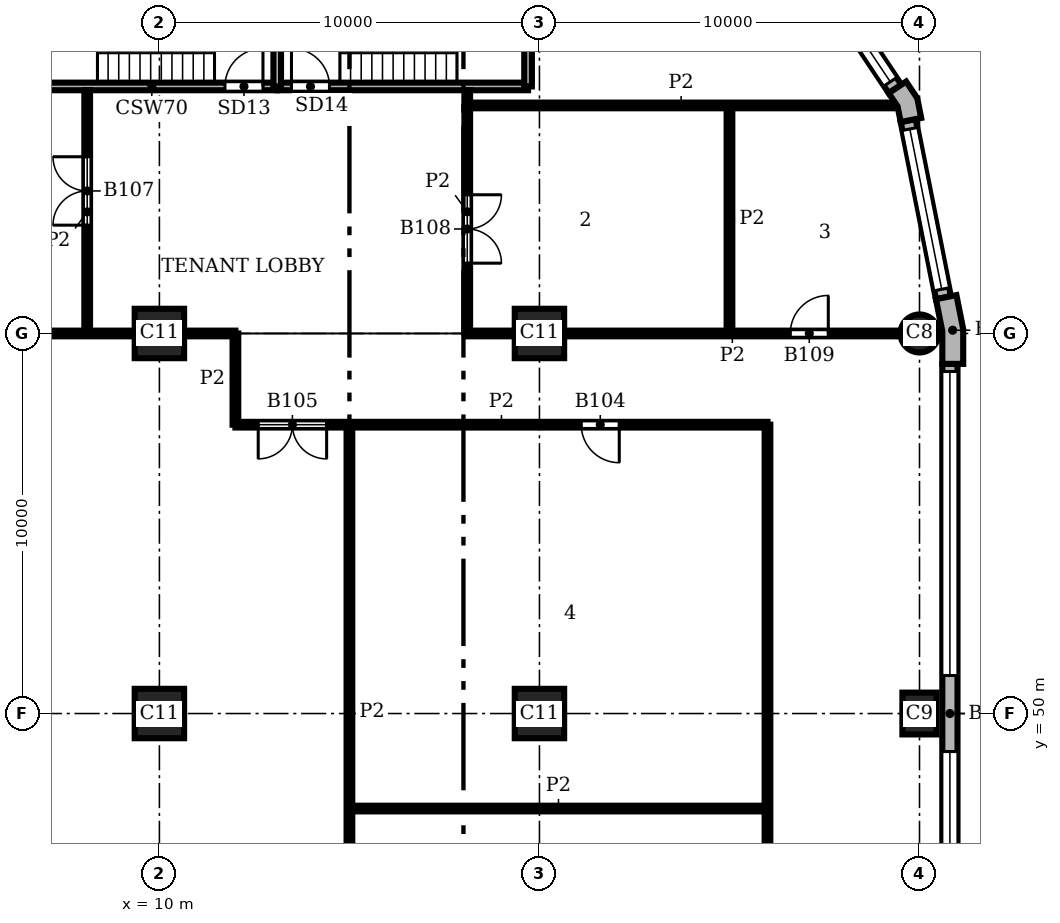
"""IFC4 building model, lengths in metres.
Left out: names, types, materials, properties, quantities, classifications, styles, units other than length and angle.
Written with IfcOpenShell. Run it as: python <this file> out.ifc"""

import sys

from ifc_helpers import new_model, si_unit, direction, frame, frame_2d, origin, origin_2d, place, context, subcontext, project, spatial, polyline, rectangle, circle, outline, extrude, element, fill, save


model = new_model("IFC4")
c1 = context("Model", 3, precision=1e-05, world=origin(), true_north=direction((0.0, 1.0)))
c2 = subcontext(c1, "Body", "Model", "MODEL_VIEW")
j1 = project(units=[si_unit("LENGTHUNIT", "METRE"), si_unit("PLANEANGLEUNIT", "RADIAN")], contexts=[c1])
p1 = place(None, origin())
s1 = spatial("IfcSite", under=j1, at=p1, CompositionType="ELEMENT")
p2 = place(p1, origin())
s2 = spatial("IfcBuilding", under=s1, at=p2, CompositionType="ELEMENT")
p3 = place(p2, frame((0.0, 0.0, 131.7)))
s3 = spatial("IfcBuildingStorey", under=s2, at=p3, CompositionType="ELEMENT", Elevation=131.7)
p4 = place(p3, frame((30.0, 50.0, 0.0), z_axis=(0.0, 0.0, 1.0), x_axis=(0.0, 1.0, 0.0)))
e1 = element("IfcColumn", 1, at=p4, inside=s3, PredefinedType="COLUMN", context=c2, shape_type="SweptSolid", body=[
    extrude(rectangle(XDim=1.1, YDim=0.9, at=origin_2d()), origin(), (0.0, 0.0, 1.0), 3.9),
])
p5 = place(p3, frame((30.0, 60.0, 0.0), z_axis=(0.0, 0.0, 1.0), x_axis=(1.0, 0.0, 0.0)))
e2 = element("IfcColumn", 2, at=p5, inside=s3, PredefinedType="COLUMN", context=c2, shape_type="SweptSolid", body=[
    extrude(circle(Radius=0.5, at=origin_2d()), origin(), (0.0, 0.0, 1.0), 3.9),
])
for number, where, z_axis, x_axis in (
    (3, (10.0, 50.0, 0.0), (0.0, 0.0, 1.0), (1.0, 0.0, 0.0)),
    (4, (10.0, 60.0, 0.0), (0.0, 0.0, 1.0), (1.0, 0.0, 0.0)),
    (5, (20.0, 50.0, 0.0), (0.0, 0.0, 1.0), (1.0, 0.0, 0.0)),
    (6, (20.0, 60.0, 0.0), (0.0, 0.0, 1.0), (1.0, 0.0, 0.0)),
):
    element("IfcColumn", number, at=place(p3, frame(where, z_axis=z_axis, x_axis=x_axis)), inside=s3, PredefinedType="COLUMN", context=c2, shape_type="SweptSolid", body=[
        extrude(rectangle(XDim=1.3, YDim=1.3, at=origin_2d()), origin(), (0.0, 0.0, 1.0), 3.9),
    ])
p6 = place(p3, origin())
e7 = element("IfcWall", 7, at=p6, inside=s3, PredefinedType="SOLIDWALL", context=c2, shape_type="SweptSolid", body=[
    extrude(outline(polyline([(31.0, 59.2), (31.15, 59.2), (31.15, 60.113), (30.972, 61.009), (30.825, 60.98), (30.432, 60.902), (30.6, 60.059), (30.6, 59.2), (31.0, 59.2)])), origin(), (0.0, 0.0, 1.0), 3.9),
])
e8 = element("IfcWall", 8, at=p6, inside=s3, PredefinedType="SOLIDWALL", context=c2, shape_type="SweptSolid", body=[
    extrude(outline(polyline([(29.897, 65.641), (30.045, 65.67), (29.941, 66.189), (29.648, 66.629), (29.523, 66.545), (29.19, 66.323), (29.423, 65.974), (29.505, 65.563), (29.897, 65.641)])), origin(), (0.0, 0.0, 1.0), 3.9),
])
p7 = place(p3, frame((30.8, 40.8, 0.0), z_axis=(0.0, 0.0, 1.0), x_axis=(0.0, 1.0, 0.0)))
e9 = element("IfcWall", 9, at=p7, inside=s3, PredefinedType="SOLIDWALL", context=c2, shape_type="SweptSolid", body=[
    extrude(rectangle(XDim=18.4, YDim=0.4, at=frame_2d((9.2, 0.0))), origin(), (0.0, 0.0, 1.0), 3.9),
])
p8 = place(p7, frame((0.2, 0.0, 0.9)))
e10 = element("IfcOpeningElement", 10, at=p8, cuts=e9, PredefinedType="OPENING", context=c2, shape_type="SweptSolid", body=[
    extrude(rectangle(XDim=8.0, YDim=2.35, at=frame_2d((4.0, 1.175))), frame((0.0, 0.21, 0.0), z_axis=(0.0, -1.0, 0.0), x_axis=(1.0, 0.0, 0.0)), (0.0, 0.0, 1.0), 0.42),
])
p9 = place(p7, frame((10.2, 0.0, 0.9)))
e11 = element("IfcOpeningElement", 11, at=p9, cuts=e9, PredefinedType="OPENING", context=c2, shape_type="SweptSolid", body=[
    extrude(rectangle(XDim=8.0, YDim=2.35, at=frame_2d((4.0, 1.175))), frame((0.0, 0.21, 0.0), z_axis=(0.0, -1.0, 0.0), x_axis=(1.0, 0.0, 0.0)), (0.0, 0.0, 1.0), 0.42),
])
p10 = place(p3, frame((30.629, 60.941, 0.0), z_axis=(0.0, 0.0, 1.0), x_axis=(-0.195098533057, 0.98078364709, 0.0)))
e12 = element("IfcWall", 12, at=p10, inside=s3, PredefinedType="SOLIDWALL", context=c2, shape_type="SweptSolid", body=[
    extrude(rectangle(XDim=4.753, YDim=0.4, at=frame_2d((2.376, 0.0))), origin(), (0.0, 0.0, 1.0), 3.9),
])
p11 = place(p10, frame((0.226, 0.0, 0.9)))
e13 = element("IfcOpeningElement", 13, at=p11, cuts=e12, PredefinedType="OPENING", context=c2, shape_type="SweptSolid", body=[
    extrude(rectangle(XDim=4.3, YDim=2.35, at=frame_2d((2.15, 1.175))), frame((0.0, 0.21, 0.0), z_axis=(0.0, -1.0, 0.0), x_axis=(1.0, 0.0, 0.0)), (0.0, 0.0, 1.0), 0.42),
])
p12 = place(p3, frame((29.357, 66.434, 0.0), z_axis=(0.0, 0.0, 1.0), x_axis=(-0.555541552266, 0.831488775454, 0.0)))
e14 = element("IfcWall", 14, at=p12, inside=s3, PredefinedType="SOLIDWALL", context=c2, shape_type="SweptSolid", body=[
    extrude(rectangle(XDim=4.753, YDim=0.4, at=frame_2d((2.376, 0.0))), origin(), (0.0, 0.0, 1.0), 3.9),
])
p13 = place(p12, frame((0.226, 0.0, 0.9)))
e15 = element("IfcOpeningElement", 15, at=p13, cuts=e14, PredefinedType="OPENING", context=c2, shape_type="SweptSolid", body=[
    extrude(rectangle(XDim=4.3, YDim=2.35, at=frame_2d((2.15, 1.175))), frame((0.0, 0.21, 0.0), z_axis=(0.0, -1.0, 0.0), x_axis=(1.0, 0.0, 0.0)), (0.0, 0.0, 1.0), 0.42),
])
p14 = place(p3, frame((6.5, 66.5, 0.0), z_axis=(0.0, 0.0, 1.0), x_axis=(1.0, 0.0, 0.0)))
e16 = element("IfcWall", 16, at=p14, inside=s3, PredefinedType="SHEAR", context=c2, shape_type="SweptSolid", body=[
    extrude(rectangle(XDim=6.6, YDim=0.2, at=frame_2d((3.3, 0.0))), origin(), (0.0, 0.0, 1.0), 3.58),
])
p15 = place(p14, frame((5.225, 0.0, 0.0)))
e17 = element("IfcOpeningElement", 17, at=p15, cuts=e16, PredefinedType="OPENING", context=c2, shape_type="SweptSolid", body=[
    extrude(rectangle(XDim=1.0, YDim=2.1, at=frame_2d((0.5, 1.05))), frame((0.0, 0.11, 0.0), z_axis=(0.0, -1.0, 0.0), x_axis=(1.0, 0.0, 0.0)), (0.0, 0.0, 1.0), 0.22),
])
p16 = place(p3, frame((13.1, 66.5, 0.0), z_axis=(0.0, 0.0, 1.0), x_axis=(1.0, 0.0, 0.0)))
e18 = element("IfcWall", 18, at=p16, inside=s3, PredefinedType="SHEAR", context=c2, shape_type="SweptSolid", body=[
    extrude(rectangle(XDim=6.6, YDim=0.2, at=frame_2d((3.3, 0.0))), origin(), (0.0, 0.0, 1.0), 3.58),
])
p17 = place(p16, frame((0.375, 0.0, 0.0)))
e19 = element("IfcOpeningElement", 19, at=p17, cuts=e18, PredefinedType="OPENING", context=c2, shape_type="SweptSolid", body=[
    extrude(rectangle(XDim=1.0, YDim=2.1, at=frame_2d((0.5, 1.05))), frame((0.0, 0.11, 0.0), z_axis=(0.0, -1.0, 0.0), x_axis=(1.0, 0.0, 0.0)), (0.0, 0.0, 1.0), 0.22),
])
for number, where, z_axis, x_axis in (
    (20, (13.1, 66.5, 0.0), (0.0, 0.0, 1.0), (0.0, 1.0, 0.0)),
    (21, (19.7, 66.5, 0.0), (0.0, 0.0, 1.0), (0.0, 1.0, 0.0)),
):
    element("IfcWall", number, at=place(p3, frame(where, z_axis=z_axis, x_axis=x_axis)), inside=s3, PredefinedType="SHEAR", context=c2, shape_type="SweptSolid", body=[
        extrude(rectangle(XDim=3.3, YDim=0.2, at=frame_2d((1.65, 0.0))), origin(), (0.0, 0.0, 1.0), 3.58),
    ])
p18 = place(p3, frame((8.1, 60.0, 0.0), z_axis=(0.0, 0.0, 1.0), x_axis=(0.0, 1.0, 0.0)))
e22 = element("IfcWall", 22, at=p18, inside=s3, PredefinedType="PARTITIONING", context=c2, shape_type="SweptSolid", body=[
    extrude(rectangle(XDim=6.4, YDim=0.15, at=frame_2d((3.2, 0.0))), origin(), (0.0, 0.0, 1.0), 3.58),
])
p19 = place(p18, frame((2.85, 0.0, 0.0)))
e23 = element("IfcOpeningElement", 23, at=p19, cuts=e22, PredefinedType="OPENING", context=c2, shape_type="SweptSolid", body=[
    extrude(rectangle(XDim=1.8, YDim=2.1, at=frame_2d((0.9, 1.05))), frame((0.0, 0.085, 0.0), z_axis=(0.0, -1.0, 0.0), x_axis=(1.0, 0.0, 0.0)), (0.0, 0.0, 1.0), 0.17),
])
p20 = place(p3, frame((12.0, 57.6, 0.0), z_axis=(0.0, 0.0, 1.0), x_axis=(0.0, 1.0, 0.0)))
e24 = element("IfcWall", 24, at=p20, inside=s3, PredefinedType="PARTITIONING", context=c2, shape_type="SweptSolid", body=[
    extrude(rectangle(XDim=2.4, YDim=0.15, at=frame_2d((1.2, 0.0))), origin(), (0.0, 0.0, 1.0), 3.58),
])
p21 = place(p3, frame((15.0, 42.5, 0.0), z_axis=(0.0, 0.0, 1.0), x_axis=(0.0, 1.0, 0.0)))
e25 = element("IfcWall", 25, at=p21, inside=s3, PredefinedType="PARTITIONING", context=c2, shape_type="SweptSolid", body=[
    extrude(rectangle(XDim=15.1, YDim=0.15, at=frame_2d((7.55, 0.0))), origin(), (0.0, 0.0, 1.0), 3.58),
])
p22 = place(p3, frame((18.1, 60.0, 0.0), z_axis=(0.0, 0.0, 1.0), x_axis=(0.0, 1.0, 0.0)))
e26 = element("IfcWall", 26, at=p22, inside=s3, PredefinedType="PARTITIONING", context=c2, shape_type="SweptSolid", body=[
    extrude(rectangle(XDim=6.4, YDim=0.15, at=frame_2d((3.2, 0.0))), origin(), (0.0, 0.0, 1.0), 3.58),
])
p23 = place(p22, frame((1.85, 0.0, 0.0)))
e27 = element("IfcOpeningElement", 27, at=p23, cuts=e26, PredefinedType="OPENING", context=c2, shape_type="SweptSolid", body=[
    extrude(rectangle(XDim=1.8, YDim=2.1, at=frame_2d((0.9, 1.05))), frame((0.0, 0.085, 0.0), z_axis=(0.0, -1.0, 0.0), x_axis=(1.0, 0.0, 0.0)), (0.0, 0.0, 1.0), 0.17),
])
p24 = place(p3, frame((25.0, 60.0, 0.0), z_axis=(0.0, 0.0, 1.0), x_axis=(0.0, 1.0, 0.0)))
e28 = element("IfcWall", 28, at=p24, inside=s3, PredefinedType="PARTITIONING", context=c2, shape_type="SweptSolid", body=[
    extrude(rectangle(XDim=6.0, YDim=0.15, at=frame_2d((3.0, 0.0))), origin(), (0.0, 0.0, 1.0), 3.58),
])
p25 = place(p3, frame((26.0, 28.0, 0.0), z_axis=(0.0, 0.0, 1.0), x_axis=(0.0, 1.0, 0.0)))
e29 = element("IfcWall", 29, at=p25, inside=s3, PredefinedType="PARTITIONING", context=c2, shape_type="SweptSolid", body=[
    extrude(rectangle(XDim=29.6, YDim=0.15, at=frame_2d((14.8, 0.0))), origin(), (0.0, 0.0, 1.0), 3.58),
])
p26 = place(p25, frame((7.85, 0.0, 0.0)))
e30 = element("IfcOpeningElement", 30, at=p26, cuts=e29, PredefinedType="OPENING", context=c2, shape_type="SweptSolid", body=[
    extrude(rectangle(XDim=1.8, YDim=2.1, at=frame_2d((0.9, 1.05))), frame((0.0, 0.085, 0.0), z_axis=(0.0, -1.0, 0.0), x_axis=(1.0, 0.0, 0.0)), (0.0, 0.0, 1.0), 0.17),
])
p27 = place(p3, frame((15.0, 47.5, 0.0), z_axis=(0.0, 0.0, 1.0), x_axis=(1.0, 0.0, 0.0)))
e31 = element("IfcWall", 31, at=p27, inside=s3, PredefinedType="PARTITIONING", context=c2, shape_type="SweptSolid", body=[
    extrude(rectangle(XDim=11.0, YDim=0.15, at=frame_2d((5.5, 0.0))), origin(), (0.0, 0.0, 1.0), 3.58),
])
p28 = place(p3, frame((12.0, 57.6, 0.0), z_axis=(0.0, 0.0, 1.0), x_axis=(1.0, 0.0, 0.0)))
e32 = element("IfcWall", 32, at=p28, inside=s3, PredefinedType="PARTITIONING", context=c2, shape_type="SweptSolid", body=[
    extrude(rectangle(XDim=14.0, YDim=0.15, at=frame_2d((7.0, 0.0))), origin(), (0.0, 0.0, 1.0), 3.58),
])
p29 = place(p28, frame((9.1, 0.0, 0.0)))
e33 = element("IfcOpeningElement", 33, at=p29, cuts=e32, PredefinedType="OPENING", context=c2, shape_type="SweptSolid", body=[
    extrude(rectangle(XDim=1.0, YDim=2.1, at=frame_2d((0.5, 1.05))), frame((0.0, 0.085, 0.0), z_axis=(0.0, -1.0, 0.0), x_axis=(1.0, 0.0, 0.0)), (0.0, 0.0, 1.0), 0.17),
])
p30 = place(p28, frame((0.6, 0.0, 0.0)))
e34 = element("IfcOpeningElement", 34, at=p30, cuts=e32, PredefinedType="OPENING", context=c2, shape_type="SweptSolid", body=[
    extrude(rectangle(XDim=1.8, YDim=2.1, at=frame_2d((0.9, 1.05))), frame((0.0, 0.085, 0.0), z_axis=(0.0, -1.0, 0.0), x_axis=(1.0, 0.0, 0.0)), (0.0, 0.0, 1.0), 0.17),
])
p31 = place(p3, frame((0.5, 60.0, 0.0), z_axis=(0.0, 0.0, 1.0), x_axis=(1.0, 0.0, 0.0)))
e35 = element("IfcWall", 35, at=p31, inside=s3, PredefinedType="PARTITIONING", context=c2, shape_type="SweptSolid", body=[
    extrude(rectangle(XDim=8.85, YDim=0.15, at=frame_2d((4.425, 0.0))), origin(), (0.0, 0.0, 1.0), 3.58),
])
p32 = place(p3, frame((10.65, 60.0, 0.0), z_axis=(0.0, 0.0, 1.0), x_axis=(1.0, 0.0, 0.0)))
e36 = element("IfcWall", 36, at=p32, inside=s3, PredefinedType="PARTITIONING", context=c2, shape_type="SweptSolid", body=[
    extrude(rectangle(XDim=1.35, YDim=0.15, at=frame_2d((0.675, 0.0))), origin(), (0.0, 0.0, 1.0), 3.58),
])
p33 = place(p3, frame((18.1, 60.0, 0.0), z_axis=(0.0, 0.0, 1.0), x_axis=(1.0, 0.0, 0.0)))
e37 = element("IfcWall", 37, at=p33, inside=s3, PredefinedType="PARTITIONING", context=c2, shape_type="SweptSolid", body=[
    extrude(rectangle(XDim=1.25, YDim=0.15, at=frame_2d((0.625, 0.0))), origin(), (0.0, 0.0, 1.0), 3.58),
])
p34 = place(p3, frame((20.65, 60.0, 0.0), z_axis=(0.0, 0.0, 1.0), x_axis=(1.0, 0.0, 0.0)))
e38 = element("IfcWall", 38, at=p34, inside=s3, PredefinedType="PARTITIONING", context=c2, shape_type="SweptSolid", body=[
    extrude(rectangle(XDim=8.85, YDim=0.15, at=frame_2d((4.425, 0.0))), origin(), (0.0, 0.0, 1.0), 3.58),
])
p35 = place(p34, frame((5.95, 0.0, 0.0)))
e39 = element("IfcOpeningElement", 39, at=p35, cuts=e38, PredefinedType="OPENING", context=c2, shape_type="SweptSolid", body=[
    extrude(rectangle(XDim=1.0, YDim=2.1, at=frame_2d((0.5, 1.05))), frame((0.0, 0.085, 0.0), z_axis=(0.0, -1.0, 0.0), x_axis=(1.0, 0.0, 0.0)), (0.0, 0.0, 1.0), 0.17),
])
p36 = place(p3, frame((18.1, 66.0, 0.0), z_axis=(0.0, 0.0, 1.0), x_axis=(1.0, 0.0, 0.0)))
e40 = element("IfcWall", 40, at=p36, inside=s3, PredefinedType="PARTITIONING", context=c2, shape_type="SweptSolid", body=[
    extrude(rectangle(XDim=11.256, YDim=0.15, at=frame_2d((5.628, 0.0))), origin(), (0.0, 0.0, 1.0), 3.58),
])
p37 = place(p8, origin())
e41 = element("IfcWindow", 41, at=p37, inside=s3, PartitioningType="SINGLE_PANEL", PredefinedType="WINDOW", context=c2, shape_type="SweptSolid", body=[
    extrude(rectangle(XDim=8.0, YDim=2.35, at=frame_2d((4.0, 1.175))), frame((0.0, 0.16, 0.0), z_axis=(0.0, -1.0, 0.0), x_axis=(1.0, 0.0, 0.0)), (0.0, 0.0, 1.0), 0.06),
])
fill(e10, e41)
p38 = place(p9, origin())
e42 = element("IfcWindow", 42, at=p38, inside=s3, PartitioningType="SINGLE_PANEL", PredefinedType="WINDOW", context=c2, shape_type="SweptSolid", body=[
    extrude(rectangle(XDim=8.0, YDim=2.35, at=frame_2d((4.0, 1.175))), frame((0.0, 0.16, 0.0), z_axis=(0.0, -1.0, 0.0), x_axis=(1.0, 0.0, 0.0)), (0.0, 0.0, 1.0), 0.06),
])
fill(e11, e42)
p39 = place(p11, origin())
e43 = element("IfcWindow", 43, at=p39, inside=s3, PartitioningType="SINGLE_PANEL", PredefinedType="WINDOW", context=c2, shape_type="SweptSolid", body=[
    extrude(rectangle(XDim=4.3, YDim=2.35, at=frame_2d((2.15, 1.175))), frame((0.0, 0.16, 0.0), z_axis=(0.0, -1.0, 0.0), x_axis=(1.0, 0.0, 0.0)), (0.0, 0.0, 1.0), 0.06),
])
fill(e13, e43)
p40 = place(p13, origin())
e44 = element("IfcWindow", 44, at=p40, inside=s3, PartitioningType="SINGLE_PANEL", PredefinedType="WINDOW", context=c2, shape_type="SweptSolid", body=[
    extrude(rectangle(XDim=4.3, YDim=2.35, at=frame_2d((2.15, 1.175))), frame((0.0, 0.16, 0.0), z_axis=(0.0, -1.0, 0.0), x_axis=(1.0, 0.0, 0.0)), (0.0, 0.0, 1.0), 0.06),
])
fill(e15, e44)
p41 = place(p15, origin())
e45 = element("IfcDoor", 45, at=p41, inside=s3, OperationType="SINGLE_SWING_RIGHT", PredefinedType="DOOR", context=c2, shape_type="SweptSolid", body=[
    extrude(rectangle(XDim=1.0, YDim=2.1, at=frame_2d((0.5, 1.05))), frame((0.0, 0.025, 0.0), z_axis=(0.0, -1.0, 0.0), x_axis=(1.0, 0.0, 0.0)), (0.0, 0.0, 1.0), 0.05),
])
fill(e17, e45)
p42 = place(p17, origin())
e46 = element("IfcDoor", 46, at=p42, inside=s3, OperationType="SINGLE_SWING_LEFT", PredefinedType="DOOR", context=c2, shape_type="SweptSolid", body=[
    extrude(rectangle(XDim=1.0, YDim=2.1, at=frame_2d((0.5, 1.05))), frame((0.0, 0.025, 0.0), z_axis=(0.0, -1.0, 0.0), x_axis=(1.0, 0.0, 0.0)), (0.0, 0.0, 1.0), 0.05),
])
fill(e19, e46)
p43 = place(p29, frame((1.0, 0.0, 0.0), z_axis=(0.0, 0.0, 1.0), x_axis=(-1.0, 0.0, 0.0)))
e47 = element("IfcDoor", 47, at=p43, inside=s3, OperationType="SINGLE_SWING_LEFT", PredefinedType="DOOR", context=c2, shape_type="SweptSolid", body=[
    extrude(rectangle(XDim=1.0, YDim=2.1, at=frame_2d((0.5, 1.05))), frame((0.0, 0.025, 0.0), z_axis=(0.0, -1.0, 0.0), x_axis=(1.0, 0.0, 0.0)), (0.0, 0.0, 1.0), 0.05),
])
fill(e33, e47)
p44 = place(p30, frame((1.8, 0.0, 0.0), z_axis=(0.0, 0.0, 1.0), x_axis=(-1.0, 0.0, 0.0)))
e48 = element("IfcDoor", 48, at=p44, inside=s3, OperationType="DOUBLE_DOOR_SINGLE_SWING", PredefinedType="DOOR", context=c2, shape_type="SweptSolid", body=[
    extrude(rectangle(XDim=1.8, YDim=2.1, at=frame_2d((0.9, 1.05))), frame((0.0, 0.025, 0.0), z_axis=(0.0, -1.0, 0.0), x_axis=(1.0, 0.0, 0.0)), (0.0, 0.0, 1.0), 0.05),
])
fill(e34, e48)
p45 = place(p19, origin())
e49 = element("IfcDoor", 49, at=p45, inside=s3, OperationType="DOUBLE_DOOR_SINGLE_SWING", PredefinedType="DOOR", context=c2, shape_type="SweptSolid", body=[
    extrude(rectangle(XDim=1.8, YDim=2.1, at=frame_2d((0.9, 1.05))), frame((0.0, 0.025, 0.0), z_axis=(0.0, -1.0, 0.0), x_axis=(1.0, 0.0, 0.0)), (0.0, 0.0, 1.0), 0.05),
])
fill(e23, e49)
p46 = place(p23, frame((1.8, 0.0, 0.0), z_axis=(0.0, 0.0, 1.0), x_axis=(-1.0, 0.0, 0.0)))
e50 = element("IfcDoor", 50, at=p46, inside=s3, OperationType="DOUBLE_DOOR_SINGLE_SWING", PredefinedType="DOOR", context=c2, shape_type="SweptSolid", body=[
    extrude(rectangle(XDim=1.8, YDim=2.1, at=frame_2d((0.9, 1.05))), frame((0.0, 0.025, 0.0), z_axis=(0.0, -1.0, 0.0), x_axis=(1.0, 0.0, 0.0)), (0.0, 0.0, 1.0), 0.05),
])
fill(e27, e50)
p47 = place(p35, origin())
e51 = element("IfcDoor", 51, at=p47, inside=s3, OperationType="SINGLE_SWING_RIGHT", PredefinedType="DOOR", context=c2, shape_type="SweptSolid", body=[
    extrude(rectangle(XDim=1.0, YDim=2.1, at=frame_2d((0.5, 1.05))), frame((0.0, 0.025, 0.0), z_axis=(0.0, -1.0, 0.0), x_axis=(1.0, 0.0, 0.0)), (0.0, 0.0, 1.0), 0.05),
])
fill(e39, e51)
save(model, sys.argv[1])
